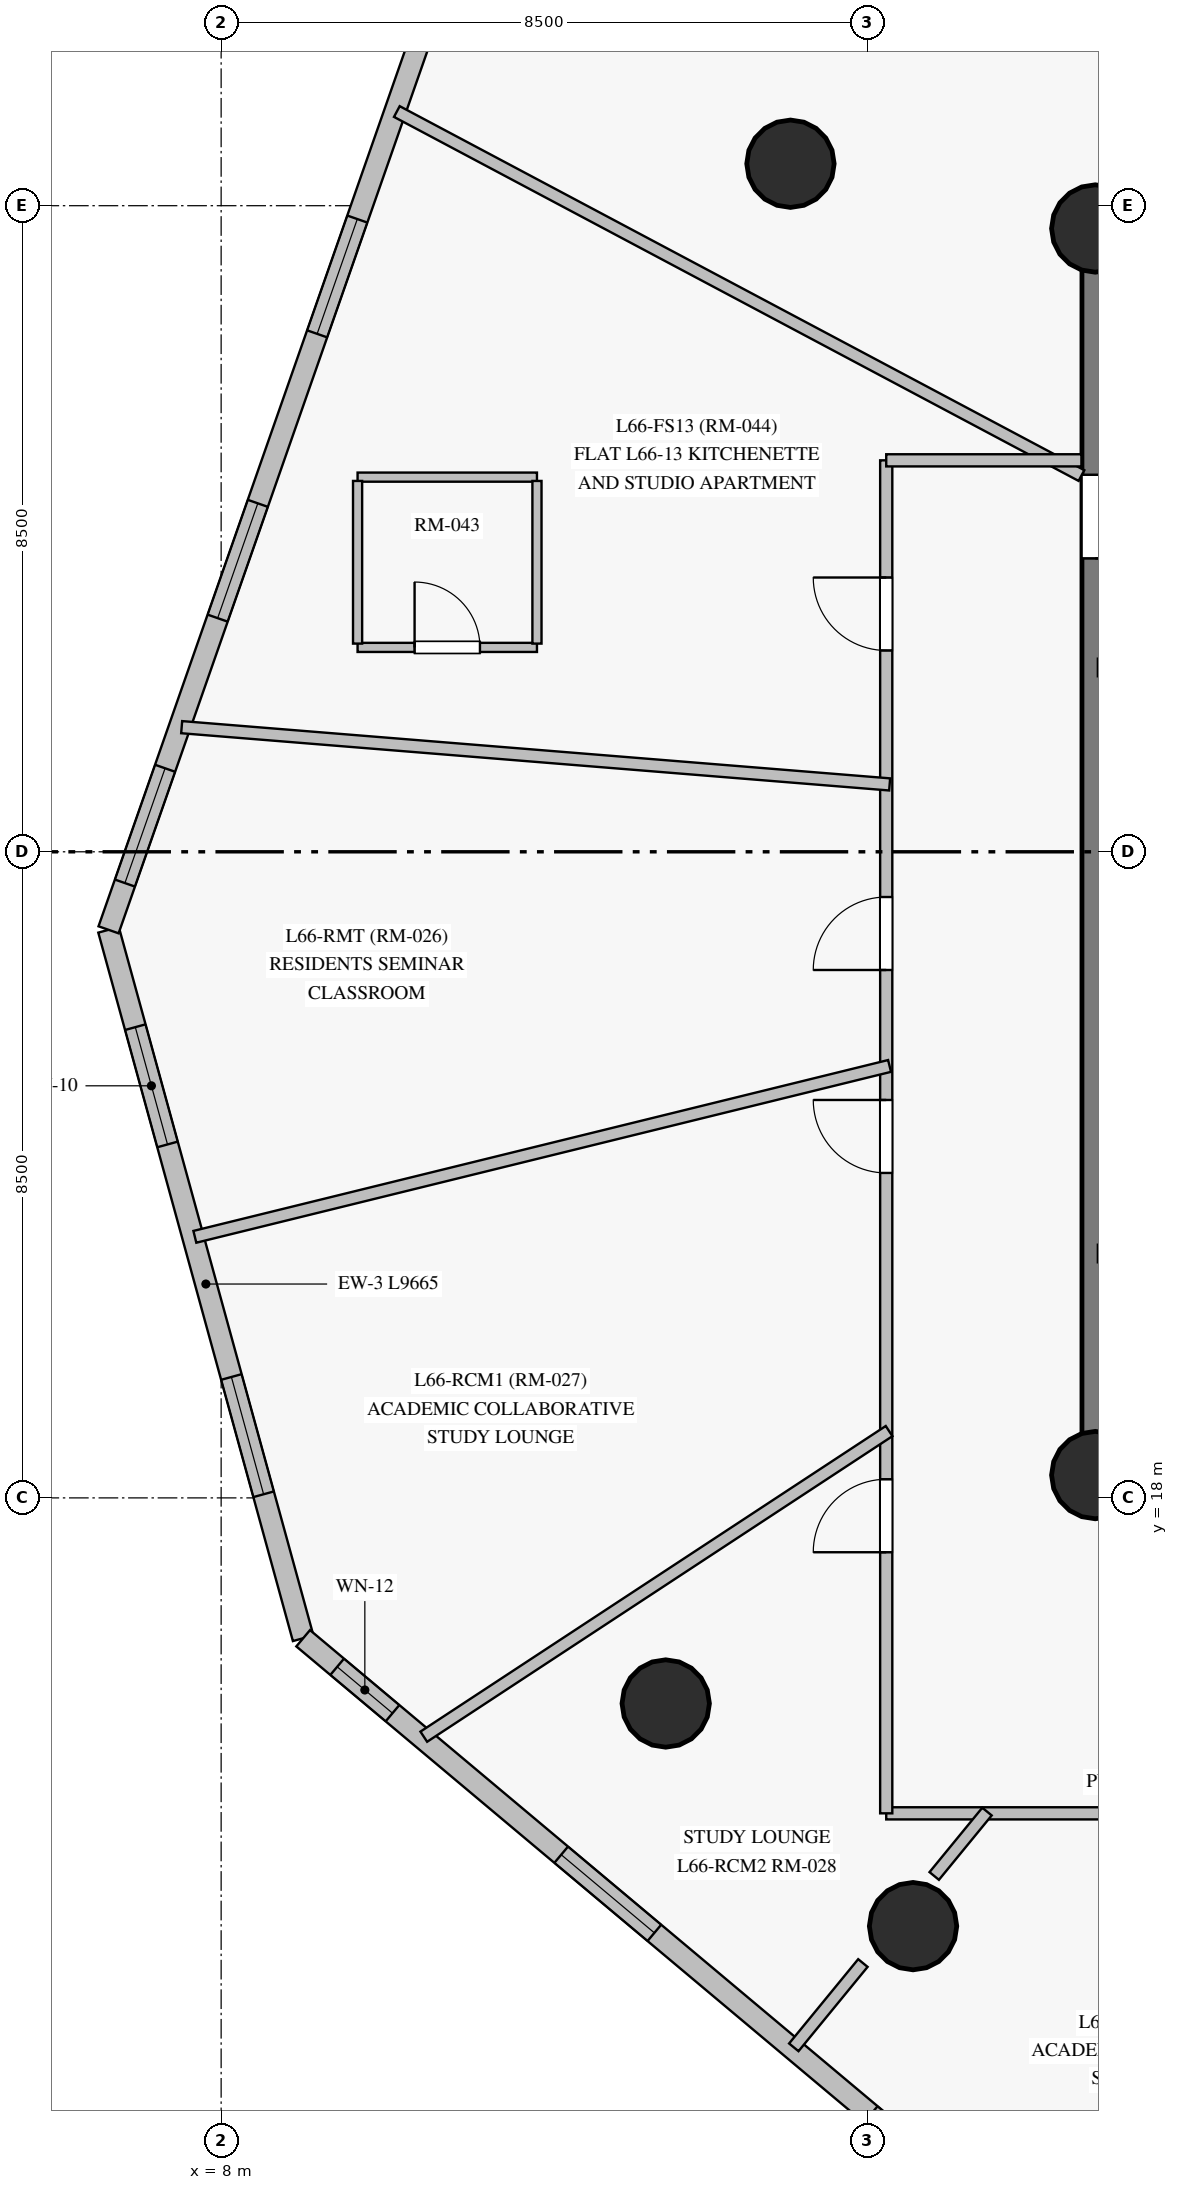
"""IFC4 building model, lengths in metres.
Left out: names, types, materials, properties, quantities, classifications, styles, units other than length and angle.
Written with IfcOpenShell. Run it as: python <this file> out.ifc"""

import sys

from ifc_helpers import new_model, si_unit, direction, frame, frame_2d, origin, origin_with_axes, origin_2d, place, context, subcontext, project, spatial, rectangle, circle, extrude, source, transform, mapped, element, fill, save


model = new_model("IFC4")
c1 = context("Model", 3, precision=1e-05, world=origin(), true_north=direction((0.0, 1.0)))
c2 = subcontext(c1, "Body", "Model", "MODEL_VIEW")
j1 = project(units=[si_unit("LENGTHUNIT", "METRE"), si_unit("PLANEANGLEUNIT", "RADIAN")], contexts=[c1])
p1 = place(None, origin())
s1 = spatial("IfcSite", under=j1, at=p1, CompositionType="ELEMENT")
p2 = place(p1, origin())
s2 = spatial("IfcBuilding", under=s1, at=p2, CompositionType="ELEMENT")
p3 = place(p2, frame((0.0, 0.0, 226.05)))
s3 = spatial("IfcBuildingStorey", under=s2, at=p3, CompositionType="ELEMENT", Elevation=226.05)
p4 = place(p3, frame((19.5, 18.3, 0.0), z_axis=(0.0, 0.0, 1.0), x_axis=(1.0, 0.0, 0.0)))
e1 = element("IfcWall", 1, at=p4, inside=s3, PredefinedType="SHEAR", context=c2, shape_type="SweptSolid", body=[
    extrude(rectangle(XDim=7.05, YDim=0.35, at=frame_2d((3.525, 0.0))), origin(), (0.0, 0.0, 1.0), 2.85),
])
p5 = place(p4, frame((4.2, 0.0, 0.0)))
e2 = element("IfcOpeningElement", 2, at=p5, cuts=e1, PredefinedType="OPENING", context=c2, shape_type="SweptSolid", body=[
    extrude(rectangle(XDim=1.4, YDim=2.2, at=frame_2d((0.7, 1.1))), frame((0.0, 0.185, 0.0), z_axis=(0.0, -1.0, 0.0), x_axis=(1.0, 0.0, 0.0)), (0.0, 0.0, 1.0), 0.37),
])
p6 = place(p3, frame((26.55, 34.7, 0.0), z_axis=(0.0, 0.0, 1.0), x_axis=(-1.0, 0.0, 0.0)))
e3 = element("IfcWall", 3, at=p6, inside=s3, PredefinedType="SHEAR", context=c2, shape_type="SweptSolid", body=[
    extrude(rectangle(XDim=7.05, YDim=0.35, at=frame_2d((3.525, 0.0))), origin(), (0.0, 0.0, 1.0), 2.85),
])
p7 = place(p3, frame((19.5, 34.7, 0.0), z_axis=(0.0, 0.0, 1.0), x_axis=(0.0, -1.0, 0.0)))
e4 = element("IfcWall", 4, at=p7, inside=s3, PredefinedType="SHEAR", context=c2, shape_type="SweptSolid", body=[
    extrude(rectangle(XDim=16.4, YDim=0.35, at=frame_2d((8.2, 0.0))), origin(), (0.0, 0.0, 1.0), 2.85),
])
p8 = place(p7, frame((3.24, 0.0, 0.0)))
e5 = element("IfcOpeningElement", 5, at=p8, cuts=e4, PredefinedType="OPENING", context=c2, shape_type="SweptSolid", body=[
    extrude(rectangle(XDim=1.1, YDim=2.15, at=frame_2d((0.55, 1.075))), frame((0.0, 0.185, 0.0), z_axis=(0.0, -1.0, 0.0), x_axis=(1.0, 0.0, 0.0)), (0.0, 0.0, 1.0), 0.37),
])
m1 = source(origin_with_axes(), c2, "Body", "SweptSolid", [
    extrude(circle(Radius=0.575, at=origin_2d()), origin(), (0.0, 0.0, 1.0), 3.05),
])
for number, where, z_axis, x_axis in (
    (6, (19.5, 18.3, 0.0), (0.0, 0.0, 1.0), (1.0, 0.0, 0.0)),
    (7, (19.5, 34.7, 0.0), (0.0, 0.0, 1.0), (1.0, 0.0, 0.0)),
    (8, (15.49, 35.552, 0.0), (0.0, 0.0, 1.0), (1.0, 0.0, 0.0)),
    (9, (13.849, 15.295, 0.0), (0.0, 0.0, 1.0), (1.0, 0.0, 0.0)),
    (10, (17.103, 12.366, 0.0), (0.0, 0.0, 1.0), (1.0, 0.0, 0.0)),
):
    element("IfcColumn", number, at=place(p3, frame(where, z_axis=z_axis, x_axis=x_axis)), inside=s3, PredefinedType="COLUMN", context=c2, shape_type="MappedRepresentation", body=[
        mapped(m1, transform((0.0, 0.0, 0.0), scale=1.0)),
    ])
p9 = place(p3, frame((6.519, 25.474, 0.0), z_axis=(0.0, 0.0, 1.0), x_axis=(0.264888767951, -0.964278974474, 0.0)))
e11 = element("IfcWall", 11, at=p9, inside=s3, PredefinedType="SOLIDWALL", context=c2, shape_type="SweptSolid", body=[
    extrude(rectangle(XDim=9.666, YDim=0.28, at=frame_2d((4.833, 0.0))), origin(), (0.0, 0.0, 1.0), 2.85),
])
p10 = place(p9, frame((1.328, 0.0, 0.85)))
e12 = element("IfcOpeningElement", 12, at=p10, cuts=e11, PredefinedType="OPENING", context=c2, shape_type="SweptSolid", body=[
    extrude(rectangle(XDim=1.6, YDim=1.6, at=frame_2d((0.8, 0.8))), frame((0.0, 0.15, 0.0), z_axis=(0.0, -1.0, 0.0), x_axis=(1.0, 0.0, 0.0)), (0.0, 0.0, 1.0), 0.3),
])
p11 = place(p9, frame((6.101, 0.0, 0.85)))
e13 = element("IfcOpeningElement", 13, at=p11, cuts=e11, PredefinedType="OPENING", context=c2, shape_type="SweptSolid", body=[
    extrude(rectangle(XDim=1.6, YDim=1.6, at=frame_2d((0.8, 0.8))), frame((0.0, 0.15, 0.0), z_axis=(0.0, -1.0, 0.0), x_axis=(1.0, 0.0, 0.0)), (0.0, 0.0, 1.0), 0.3),
])
p12 = place(p3, frame((9.079, 16.153, 0.0), z_axis=(0.0, 0.0, 1.0), x_axis=(0.766159608143, -0.64265033638, 0.0)))
e14 = element("IfcWall", 14, at=p12, inside=s3, PredefinedType="SOLIDWALL", context=c2, shape_type="SweptSolid", body=[
    extrude(rectangle(XDim=12.75, YDim=0.28, at=frame_2d((6.375, 0.0))), origin(), (0.0, 0.0, 1.0), 2.85),
])
p13 = place(p12, frame((0.584, 0.0, 0.85)))
e15 = element("IfcOpeningElement", 15, at=p13, cuts=e14, PredefinedType="OPENING", context=c2, shape_type="SweptSolid", body=[
    extrude(rectangle(XDim=0.95, YDim=1.5, at=frame_2d((0.475, 0.75))), frame((0.0, 0.15, 0.0), z_axis=(0.0, -1.0, 0.0), x_axis=(1.0, 0.0, 0.0)), (0.0, 0.0, 1.0), 0.3),
])
p14 = place(p12, frame((4.431, 0.0, 0.85)))
e16 = element("IfcOpeningElement", 16, at=p14, cuts=e14, PredefinedType="OPENING", context=c2, shape_type="SweptSolid", body=[
    extrude(rectangle(XDim=1.6, YDim=1.6, at=frame_2d((0.8, 0.8))), frame((0.0, 0.15, 0.0), z_axis=(0.0, -1.0, 0.0), x_axis=(1.0, 0.0, 0.0)), (0.0, 0.0, 1.0), 0.3),
])
p15 = place(p12, frame((9.747, 0.0, 0.85)))
e17 = element("IfcOpeningElement", 17, at=p15, cuts=e14, PredefinedType="OPENING", context=c2, shape_type="SweptSolid", body=[
    extrude(rectangle(XDim=1.6, YDim=1.6, at=frame_2d((0.8, 0.8))), frame((0.0, 0.15, 0.0), z_axis=(0.0, -1.0, 0.0), x_axis=(1.0, 0.0, 0.0)), (0.0, 0.0, 1.0), 0.3),
])
p16 = place(p3, frame((10.731, 37.508, 0.0), z_axis=(0.0, 0.0, 1.0), x_axis=(-0.330347012997, -0.943859550465, 0.0)))
e18 = element("IfcWall", 18, at=p16, inside=s3, PredefinedType="SOLIDWALL", context=c2, shape_type="SweptSolid", body=[
    extrude(rectangle(XDim=12.75, YDim=0.28, at=frame_2d((6.375, 0.0))), origin(), (0.0, 0.0, 1.0), 2.85),
])
p17 = place(p16, frame((2.843, 0.0, 0.85)))
e19 = element("IfcOpeningElement", 19, at=p17, cuts=e18, PredefinedType="OPENING", context=c2, shape_type="SweptSolid", body=[
    extrude(rectangle(XDim=1.6, YDim=1.6, at=frame_2d((0.8, 0.8))), frame((0.0, 0.15, 0.0), z_axis=(0.0, -1.0, 0.0), x_axis=(1.0, 0.0, 0.0)), (0.0, 0.0, 1.0), 0.3),
])
p18 = place(p16, frame((6.806, 0.0, 0.85)))
e20 = element("IfcOpeningElement", 20, at=p18, cuts=e18, PredefinedType="OPENING", context=c2, shape_type="SweptSolid", body=[
    extrude(rectangle(XDim=1.6, YDim=1.6, at=frame_2d((0.8, 0.8))), frame((0.0, 0.15, 0.0), z_axis=(0.0, -1.0, 0.0), x_axis=(1.0, 0.0, 0.0)), (0.0, 0.0, 1.0), 0.3),
])
p19 = place(p16, frame((10.498, 0.0, 0.85)))
e21 = element("IfcOpeningElement", 21, at=p19, cuts=e18, PredefinedType="OPENING", context=c2, shape_type="SweptSolid", body=[
    extrude(rectangle(XDim=1.6, YDim=1.6, at=frame_2d((0.8, 0.8))), frame((0.0, 0.15, 0.0), z_axis=(0.0, -1.0, 0.0), x_axis=(1.0, 0.0, 0.0)), (0.0, 0.0, 1.0), 0.3),
])
p20 = place(p3, frame((41.8, 13.85, 0.0), z_axis=(0.0, 0.0, 1.0), x_axis=(-1.0, 0.0, 0.0)))
e22 = element("IfcWall", 22, at=p20, inside=s3, PredefinedType="PARTITIONING", context=c2, shape_type="SweptSolid", body=[
    extrude(rectangle(XDim=25.05, YDim=0.16, at=frame_2d((12.525, 0.0))), origin(), (0.0, 0.0, 1.0), 2.3),
])
p21 = place(p20, frame((9.563, 0.0, 0.0)))
e23 = element("IfcOpeningElement", 23, at=p21, cuts=e22, PredefinedType="OPENING", context=c2, shape_type="SweptSolid", body=[
    extrude(rectangle(XDim=0.96, YDim=2.15, at=frame_2d((0.48, 1.075))), frame((0.0, 0.09, 0.0), z_axis=(0.0, -1.0, 0.0), x_axis=(1.0, 0.0, 0.0)), (0.0, 0.0, 1.0), 0.18),
])
p22 = place(p20, frame((4.621, 0.0, 0.0)))
e24 = element("IfcOpeningElement", 24, at=p22, cuts=e22, PredefinedType="OPENING", context=c2, shape_type="SweptSolid", body=[
    extrude(rectangle(XDim=0.96, YDim=2.15, at=frame_2d((0.48, 1.075))), frame((0.0, 0.09, 0.0), z_axis=(0.0, -1.0, 0.0), x_axis=(1.0, 0.0, 0.0)), (0.0, 0.0, 1.0), 0.18),
])
p23 = place(p20, frame((18.312, 0.0, 0.0)))
e25 = element("IfcOpeningElement", 25, at=p23, cuts=e22, PredefinedType="OPENING", context=c2, shape_type="SweptSolid", body=[
    extrude(rectangle(XDim=0.96, YDim=2.15, at=frame_2d((0.48, 1.075))), frame((0.0, 0.09, 0.0), z_axis=(0.0, -1.0, 0.0), x_axis=(1.0, 0.0, 0.0)), (0.0, 0.0, 1.0), 0.18),
])
p24 = place(p20, frame((15.808, 0.0, 0.0)))
e26 = element("IfcOpeningElement", 26, at=p24, cuts=e22, PredefinedType="OPENING", context=c2, shape_type="SweptSolid", body=[
    extrude(rectangle(XDim=0.96, YDim=2.15, at=frame_2d((0.48, 1.075))), frame((0.0, 0.09, 0.0), z_axis=(0.0, -1.0, 0.0), x_axis=(1.0, 0.0, 0.0)), (0.0, 0.0, 1.0), 0.18),
])
p25 = place(p3, frame((16.75, 13.85, 0.0), z_axis=(0.0, 0.0, 1.0), x_axis=(0.0, 1.0, 0.0)))
e27 = element("IfcWall", 27, at=p25, inside=s3, PredefinedType="PARTITIONING", context=c2, shape_type="SweptSolid", body=[
    extrude(rectangle(XDim=17.8, YDim=0.16, at=frame_2d((8.9, 0.0))), origin(), (0.0, 0.0, 1.0), 2.45),
])
p26 = place(p25, frame((15.299, 0.0, 0.0)))
e28 = element("IfcOpeningElement", 28, at=p26, cuts=e27, PredefinedType="OPENING", context=c2, shape_type="SweptSolid", body=[
    extrude(rectangle(XDim=0.96, YDim=2.15, at=frame_2d((0.48, 1.075))), frame((0.0, 0.09, 0.0), z_axis=(0.0, -1.0, 0.0), x_axis=(1.0, 0.0, 0.0)), (0.0, 0.0, 1.0), 0.18),
])
p27 = place(p25, frame((11.095, 0.0, 0.0)))
e29 = element("IfcOpeningElement", 29, at=p27, cuts=e27, PredefinedType="OPENING", context=c2, shape_type="SweptSolid", body=[
    extrude(rectangle(XDim=0.96, YDim=2.15, at=frame_2d((0.48, 1.075))), frame((0.0, 0.09, 0.0), z_axis=(0.0, -1.0, 0.0), x_axis=(1.0, 0.0, 0.0)), (0.0, 0.0, 1.0), 0.18),
])
p28 = place(p25, frame((8.425, 0.0, 0.0)))
e30 = element("IfcOpeningElement", 30, at=p28, cuts=e27, PredefinedType="OPENING", context=c2, shape_type="SweptSolid", body=[
    extrude(rectangle(XDim=0.96, YDim=2.15, at=frame_2d((0.48, 1.075))), frame((0.0, 0.09, 0.0), z_axis=(0.0, -1.0, 0.0), x_axis=(1.0, 0.0, 0.0)), (0.0, 0.0, 1.0), 0.18),
])
p29 = place(p25, frame((3.435, 0.0, 0.0)))
e31 = element("IfcOpeningElement", 31, at=p29, cuts=e27, PredefinedType="OPENING", context=c2, shape_type="SweptSolid", body=[
    extrude(rectangle(XDim=0.96, YDim=2.15, at=frame_2d((0.48, 1.075))), frame((0.0, 0.09, 0.0), z_axis=(0.0, -1.0, 0.0), x_axis=(1.0, 0.0, 0.0)), (0.0, 0.0, 1.0), 0.18),
])
p30 = place(p3, frame((19.319, 31.45, 0.0), z_axis=(0.0, 0.0, 1.0), x_axis=(-0.882941204616, 0.469483577127, 0.0)))
e32 = element("IfcWall", 32, at=p30, inside=s3, PredefinedType="PARTITIONING", context=c2, shape_type="SweptSolid", body=[
    extrude(rectangle(XDim=10.201, YDim=0.16, at=frame_2d((5.101, 0.0))), origin(), (0.0, 0.0, 1.0), 2.85),
])
p31 = place(p3, frame((16.794, 23.683, 0.0), z_axis=(0.0, 0.0, 1.0), x_axis=(-0.971055618233, -0.238853482909, 0.0)))
e33 = element("IfcWall", 33, at=p31, inside=s3, PredefinedType="PARTITIONING", context=c2, shape_type="SweptSolid", body=[
    extrude(rectangle(XDim=9.412, YDim=0.16, at=frame_2d((4.706, 0.0))), origin(), (0.0, 0.0, 1.0), 2.85),
])
p32 = place(p3, frame((7.481, 28.14, 0.0), z_axis=(0.0, 0.0, 1.0), x_axis=(0.996746543384, -0.080599803055, 0.0)))
e34 = element("IfcWall", 34, at=p32, inside=s3, PredefinedType="PARTITIONING", context=c2, shape_type="SweptSolid", body=[
    extrude(rectangle(XDim=9.345, YDim=0.16, at=frame_2d((4.672, 0.0))), origin(), (0.0, 0.0, 1.0), 2.85),
])
p33 = place(p3, frame((16.788, 18.879, 0.0), z_axis=(0.0, 0.0, 1.0), x_axis=(-0.835846204998, -0.548963679664, 0.0)))
e35 = element("IfcWall", 35, at=p33, inside=s3, PredefinedType="PARTITIONING", context=c2, shape_type="SweptSolid", body=[
    extrude(rectangle(XDim=7.324, YDim=0.16, at=frame_2d((3.662, 0.0))), origin(), (0.0, 0.0, 1.0), 2.85),
])
p34 = place(p3, frame((16.75, 31.65, 0.0), z_axis=(0.0, 0.0, 1.0), x_axis=(1.0, 0.0, 0.0)))
e36 = element("IfcWall", 36, at=p34, inside=s3, PredefinedType="PARTITIONING", context=c2, shape_type="SweptSolid", body=[
    extrude(rectangle(XDim=2.568, YDim=0.16, at=frame_2d((1.284, 0.0))), origin(), (0.0, 0.0, 1.0), 2.85),
])
p35 = place(p3, frame((9.795, 29.189, 0.0), z_axis=(0.0, 0.0, 1.0), x_axis=(1.0, 0.0, 0.0)))
e37 = element("IfcWall", 37, at=p35, inside=s3, PredefinedType="PARTITIONING", context=c2, shape_type="SweptSolid", body=[
    extrude(rectangle(XDim=2.36, YDim=0.12, at=frame_2d((1.18, 0.0))), origin(), (0.0, 0.0, 1.0), 2.85),
])
p36 = place(p35, frame((0.75, 0.0, 0.0)))
e38 = element("IfcOpeningElement", 38, at=p36, cuts=e37, PredefinedType="OPENING", context=c2, shape_type="SweptSolid", body=[
    extrude(rectangle(XDim=0.86, YDim=2.1, at=frame_2d((0.43, 1.05))), frame((0.0, 0.07, 0.0), z_axis=(0.0, -1.0, 0.0), x_axis=(1.0, 0.0, 0.0)), (0.0, 0.0, 1.0), 0.14),
])
p37 = place(p3, frame((12.155, 31.429, 0.0), z_axis=(0.0, 0.0, 1.0), x_axis=(-1.0, 0.0, 0.0)))
e39 = element("IfcWall", 39, at=p37, inside=s3, PredefinedType="PARTITIONING", context=c2, shape_type="SweptSolid", body=[
    extrude(rectangle(XDim=2.36, YDim=0.12, at=frame_2d((1.18, 0.0))), origin(), (0.0, 0.0, 1.0), 2.85),
])
for number, where, z_axis, x_axis in (
    (40, (12.155, 29.239, 0.0), (0.0, 0.0, 1.0), (0.0, 1.0, 0.0)),
    (41, (9.795, 31.379, 0.0), (0.0, 0.0, 1.0), (0.0, -1.0, 0.0)),
):
    element("IfcWall", number, at=place(p3, frame(where, z_axis=z_axis, x_axis=x_axis)), inside=s3, PredefinedType="PARTITIONING", context=c2, shape_type="SweptSolid", body=[
        extrude(rectangle(XDim=2.14, YDim=0.12, at=frame_2d((1.07, 0.0))), origin(), (0.0, 0.0, 1.0), 2.85),
    ])
p38 = place(p3, frame((16.443, 11.881, 0.0), z_axis=(0.0, 0.0, 1.0), x_axis=(-0.633849489402, -0.773456414276, 0.0)))
e42 = element("IfcWall", 42, at=p38, inside=s3, PredefinedType="PARTITIONING", context=c2, shape_type="SweptSolid", body=[
    extrude(rectangle(XDim=1.434, YDim=0.16, at=frame_2d((0.717, 0.0))), origin(), (0.0, 0.0, 1.0), 2.85),
])
p39 = place(p3, frame((18.076, 13.873, 0.0), z_axis=(0.0, 0.0, 1.0), x_axis=(-0.633650360899, -0.773619557749, 0.0)))
e43 = element("IfcWall", 43, at=p39, inside=s3, PredefinedType="PARTITIONING", context=c2, shape_type="SweptSolid", body=[
    extrude(rectangle(XDim=1.095, YDim=0.16, at=frame_2d((0.548, 0.0))), origin(), (0.0, 0.0, 1.0), 2.35),
])
m2 = source(origin_with_axes(), c2, "Body", "SweptSolid", [
    extrude(rectangle(XDim=1.6, YDim=1.6, at=frame_2d((0.8, 0.8))), frame((0.0, 0.03, 0.0), z_axis=(0.0, -1.0, 0.0), x_axis=(1.0, 0.0, 0.0)), (0.0, 0.0, 1.0), 0.06),
])
p40 = place(p10, origin())
e44 = element("IfcWindow", 44, at=p40, inside=s3, PartitioningType="SINGLE_PANEL", PredefinedType="WINDOW", context=c2, shape_type="MappedRepresentation", body=[
    mapped(m2, transform((0.0, 0.0, 0.0), scale=1.0)),
])
fill(e12, e44)
p41 = place(p11, origin())
e45 = element("IfcWindow", 45, at=p41, inside=s3, PartitioningType="SINGLE_PANEL", PredefinedType="WINDOW", context=c2, shape_type="MappedRepresentation", body=[
    mapped(m2, transform((0.0, 0.0, 0.0), scale=1.0)),
])
fill(e13, e45)
m3 = source(origin_with_axes(), c2, "Body", "SweptSolid", [
    extrude(rectangle(XDim=0.95, YDim=1.5, at=frame_2d((0.475, 0.75))), frame((0.0, 0.03, 0.0), z_axis=(0.0, -1.0, 0.0), x_axis=(1.0, 0.0, 0.0)), (0.0, 0.0, 1.0), 0.06),
])
p42 = place(p13, origin())
e46 = element("IfcWindow", 46, at=p42, inside=s3, PartitioningType="SINGLE_PANEL", PredefinedType="WINDOW", context=c2, shape_type="MappedRepresentation", body=[
    mapped(m3, transform((0.0, 0.0, 0.0), scale=1.0)),
])
fill(e15, e46)
p43 = place(p14, origin())
e47 = element("IfcWindow", 47, at=p43, inside=s3, PartitioningType="SINGLE_PANEL", PredefinedType="WINDOW", context=c2, shape_type="MappedRepresentation", body=[
    mapped(m2, transform((0.0, 0.0, 0.0), scale=1.0)),
])
fill(e16, e47)
p44 = place(p17, origin())
e48 = element("IfcWindow", 48, at=p44, inside=s3, PartitioningType="SINGLE_PANEL", PredefinedType="WINDOW", context=c2, shape_type="MappedRepresentation", body=[
    mapped(m2, transform((0.0, 0.0, 0.0), scale=1.0)),
])
fill(e19, e48)
p45 = place(p18, origin())
e49 = element("IfcWindow", 49, at=p45, inside=s3, PartitioningType="SINGLE_PANEL", PredefinedType="WINDOW", context=c2, shape_type="MappedRepresentation", body=[
    mapped(m2, transform((0.0, 0.0, 0.0), scale=1.0)),
])
fill(e20, e49)
p46 = place(p19, origin())
e50 = element("IfcWindow", 50, at=p46, inside=s3, PartitioningType="SINGLE_PANEL", PredefinedType="WINDOW", context=c2, shape_type="MappedRepresentation", body=[
    mapped(m2, transform((0.0, 0.0, 0.0), scale=1.0)),
])
fill(e21, e50)
m4 = source(origin_with_axes(), c2, "Body", "SweptSolid", [
    extrude(rectangle(XDim=1.1, YDim=2.15, at=frame_2d((0.55, 1.075))), frame((0.0, 0.025, 0.0), z_axis=(0.0, -1.0, 0.0), x_axis=(1.0, 0.0, 0.0)), (0.0, 0.0, 1.0), 0.05),
])
p47 = place(p8, origin())
e51 = element("IfcDoor", 51, at=p47, inside=s3, OperationType="SINGLE_SWING_RIGHT", PredefinedType="DOOR", context=c2, shape_type="MappedRepresentation", body=[
    mapped(m4, transform((0.0, 0.0, 0.0), scale=1.0)),
])
fill(e5, e51)
m5 = source(origin_with_axes(), c2, "Body", "SweptSolid", [
    extrude(rectangle(XDim=0.86, YDim=2.1, at=frame_2d((0.43, 1.05))), frame((0.0, 0.025, 0.0), z_axis=(0.0, -1.0, 0.0), x_axis=(1.0, 0.0, 0.0)), (0.0, 0.0, 1.0), 0.05),
])
p48 = place(p36, origin())
e52 = element("IfcDoor", 52, at=p48, inside=s3, OperationType="SINGLE_SWING_LEFT", PredefinedType="DOOR", context=c2, shape_type="MappedRepresentation", body=[
    mapped(m5, transform((0.0, 0.0, 0.0), scale=1.0)),
])
fill(e38, e52)
m6 = source(origin_with_axes(), c2, "Body", "SweptSolid", [
    extrude(rectangle(XDim=0.96, YDim=2.15, at=frame_2d((0.48, 1.075))), frame((0.0, 0.025, 0.0), z_axis=(0.0, -1.0, 0.0), x_axis=(1.0, 0.0, 0.0)), (0.0, 0.0, 1.0), 0.05),
])
p49 = place(p26, origin())
e53 = element("IfcDoor", 53, at=p49, inside=s3, OperationType="SINGLE_SWING_RIGHT", PredefinedType="DOOR", context=c2, shape_type="MappedRepresentation", body=[
    mapped(m6, transform((0.0, 0.0, 0.0), scale=1.0)),
])
fill(e28, e53)
p50 = place(p27, origin())
e54 = element("IfcDoor", 54, at=p50, inside=s3, OperationType="SINGLE_SWING_LEFT", PredefinedType="DOOR", context=c2, shape_type="MappedRepresentation", body=[
    mapped(m6, transform((0.0, 0.0, 0.0), scale=1.0)),
])
fill(e29, e54)
p51 = place(p28, origin())
e55 = element("IfcDoor", 55, at=p51, inside=s3, OperationType="SINGLE_SWING_RIGHT", PredefinedType="DOOR", context=c2, shape_type="MappedRepresentation", body=[
    mapped(m6, transform((0.0, 0.0, 0.0), scale=1.0)),
])
fill(e30, e55)
p52 = place(p29, origin())
e56 = element("IfcDoor", 56, at=p52, inside=s3, OperationType="SINGLE_SWING_LEFT", PredefinedType="DOOR", context=c2, shape_type="MappedRepresentation", body=[
    mapped(m6, transform((0.0, 0.0, 0.0), scale=1.0)),
])
fill(e31, e56)
save(model, sys.argv[1])
